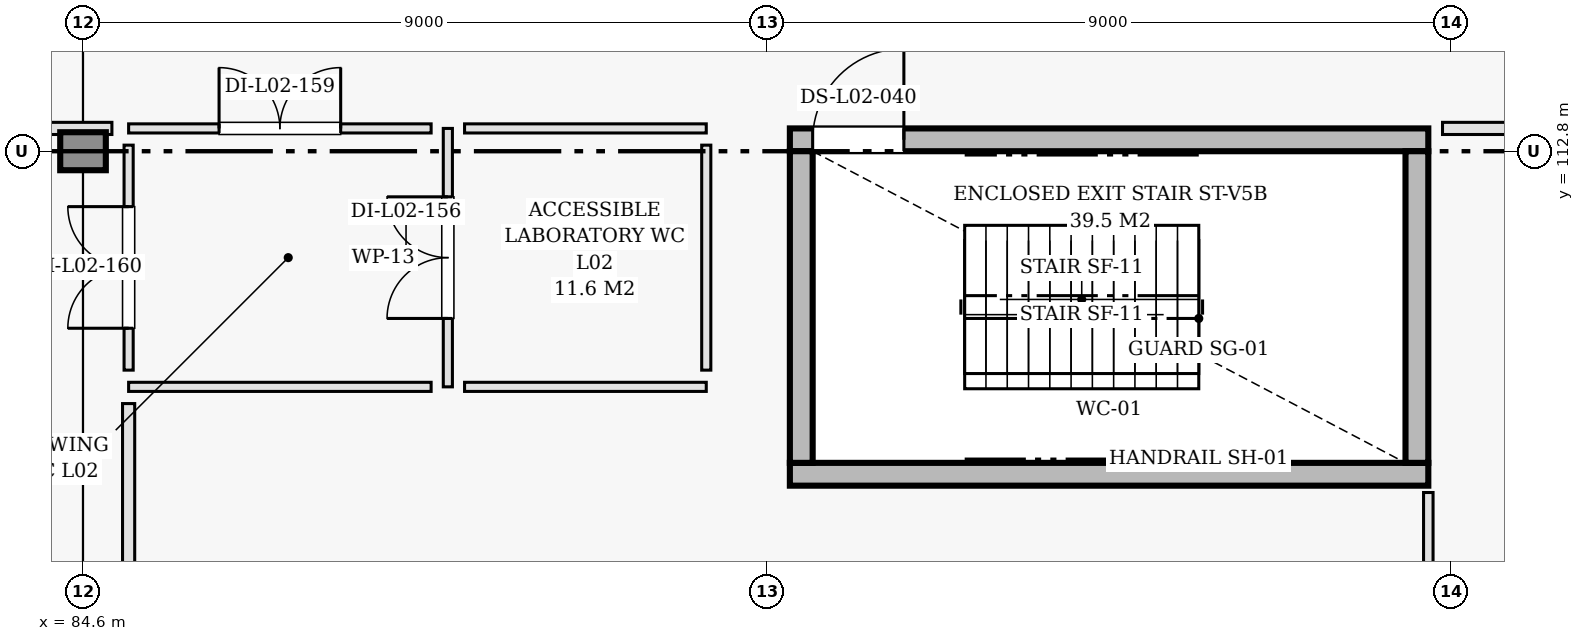
"""IFC4 building model, lengths in metres.
Left out: names, types, materials, properties, quantities, classifications, styles, units other than length and angle.
Written with IfcOpenShell. Run it as: python <this file> out.ifc"""

import sys

from ifc_helpers import new_model, si_unit, direction, frame, frame_2d, origin, origin_2d, place, context, subcontext, project, spatial, rectangle, extrude, element, fill, save


model = new_model("IFC4")
c1 = context("Model", 3, precision=1e-05, world=origin(), true_north=direction((0.0, 1.0)))
c2 = subcontext(c1, "Body", "Model", "MODEL_VIEW")
j1 = project(units=[si_unit("LENGTHUNIT", "METRE"), si_unit("PLANEANGLEUNIT", "RADIAN")], contexts=[c1])
p1 = place(None, origin())
s1 = spatial("IfcSite", under=j1, at=p1, CompositionType="ELEMENT")
p2 = place(p1, origin())
s2 = spatial("IfcBuilding", under=s1, at=p2, CompositionType="ELEMENT")
p3 = place(p2, frame((0.0, 0.0, 9.6)))
s3 = spatial("IfcBuildingStorey", under=s2, at=p3, CompositionType="ELEMENT", Elevation=9.6)
p4 = place(p3, frame((84.6, 112.8, 0.0), z_axis=(0.0, 0.0, 1.0), x_axis=(1.0, 0.0, 0.0)))
e1 = element("IfcColumn", 1, at=p4, inside=s3, PredefinedType="COLUMN", context=c2, shape_type="SweptSolid", body=[
    extrude(rectangle(XDim=0.5, YDim=0.5, at=origin_2d()), origin(), (0.0, 0.0, 1.0), 4.2),
])
p5 = place(p3, frame((93.9, 108.55, 0.0), z_axis=(0.0, 0.0, 1.0), x_axis=(1.0, 0.0, 0.0)))
e2 = element("IfcWall", 2, at=p5, inside=s3, PredefinedType="SHEAR", context=c2, shape_type="SweptSolid", body=[
    extrude(rectangle(XDim=8.4, YDim=0.3, at=frame_2d((4.2, 0.0))), origin(), (0.0, 0.0, 1.0), 3.94),
])
p6 = place(p3, frame((93.9, 112.95, 0.0), z_axis=(0.0, 0.0, 1.0), x_axis=(1.0, 0.0, 0.0)))
e3 = element("IfcWall", 3, at=p6, inside=s3, PredefinedType="SHEAR", context=c2, shape_type="SweptSolid", body=[
    extrude(rectangle(XDim=8.4, YDim=0.3, at=frame_2d((4.2, 0.0))), origin(), (0.0, 0.0, 1.0), 3.94),
])
p7 = place(p6, frame((0.3, 0.0, 0.0)))
e4 = element("IfcOpeningElement", 4, at=p7, cuts=e3, PredefinedType="OPENING", context=c2, shape_type="SweptSolid", body=[
    extrude(rectangle(XDim=1.2, YDim=2.15, at=frame_2d((0.6, 1.075))), frame((0.0, 0.16, 0.0), z_axis=(0.0, -1.0, 0.0), x_axis=(1.0, 0.0, 0.0)), (0.0, 0.0, 1.0), 0.32),
])
for number, where, z_axis, x_axis in (
    (5, (94.05, 108.7, 0.0), (0.0, 0.0, 1.0), (0.0, 1.0, 0.0)),
    (6, (102.15, 108.7, 0.0), (0.0, 0.0, 1.0), (0.0, 1.0, 0.0)),
):
    element("IfcWall", number, at=place(p3, frame(where, z_axis=z_axis, x_axis=x_axis)), inside=s3, PredefinedType="SHEAR", context=c2, shape_type="SweptSolid", body=[
        extrude(rectangle(XDim=4.1, YDim=0.3, at=frame_2d((2.05, 0.0))), origin(), (0.0, 0.0, 1.0), 3.94),
    ])
p8 = place(p3, frame((89.4, 109.7, 0.0), z_axis=(0.0, 0.0, 1.0), x_axis=(0.0, 1.0, 0.0)))
e7 = element("IfcWall", 7, at=p8, inside=s3, PredefinedType="PARTITIONING", context=c2, shape_type="SweptSolid", body=[
    extrude(rectangle(XDim=3.4, YDim=0.12, at=frame_2d((1.7, 0.0))), origin(), (0.0, 0.0, 1.0), 3.445),
])
p9 = place(p8, frame((0.9, 0.0, 0.0)))
e8 = element("IfcOpeningElement", 8, at=p9, cuts=e7, PredefinedType="OPENING", context=c2, shape_type="SweptSolid", body=[
    extrude(rectangle(XDim=1.6, YDim=2.2, at=frame_2d((0.8, 1.1))), frame((0.0, 0.07, 0.0), z_axis=(0.0, -1.0, 0.0), x_axis=(1.0, 0.0, 0.0)), (0.0, 0.0, 1.0), 0.14),
])
p10 = place(p3, frame((89.62, 109.7, 0.0), z_axis=(0.0, 0.0, 1.0), x_axis=(1.0, 0.0, 0.0)))
e9 = element("IfcWall", 9, at=p10, inside=s3, PredefinedType="PARTITIONING", context=c2, shape_type="SweptSolid", body=[
    extrude(rectangle(XDim=3.18, YDim=0.12, at=frame_2d((1.59, 0.0))), origin(), (0.0, 0.0, 1.0), 3.445),
])
p11 = place(p3, frame((89.62, 113.1, 0.0), z_axis=(0.0, 0.0, 1.0), x_axis=(1.0, 0.0, 0.0)))
e10 = element("IfcWall", 10, at=p11, inside=s3, PredefinedType="PARTITIONING", context=c2, shape_type="SweptSolid", body=[
    extrude(rectangle(XDim=3.18, YDim=0.12, at=frame_2d((1.59, 0.0))), origin(), (0.0, 0.0, 1.0), 3.94),
])
p12 = place(p3, frame((92.8, 109.92, 0.0), z_axis=(0.0, 0.0, 1.0), x_axis=(0.0, 1.0, 0.0)))
e11 = element("IfcWall", 11, at=p12, inside=s3, PredefinedType="PARTITIONING", context=c2, shape_type="SweptSolid", body=[
    extrude(rectangle(XDim=2.96, YDim=0.12, at=frame_2d((1.48, 0.0))), origin(), (0.0, 0.0, 1.0), 3.94),
])
p13 = place(p3, frame((85.2, 113.1, 0.0), z_axis=(0.0, 0.0, 1.0), x_axis=(1.0, 0.0, 0.0)))
e12 = element("IfcWall", 12, at=p13, inside=s3, PredefinedType="PARTITIONING", context=c2, shape_type="SweptSolid", body=[
    extrude(rectangle(XDim=3.98, YDim=0.12, at=frame_2d((1.99, 0.0))), origin(), (0.0, 0.0, 1.0), 3.94),
])
p14 = place(p13, frame((1.19, 0.0, 0.0)))
e13 = element("IfcOpeningElement", 13, at=p14, cuts=e12, PredefinedType="OPENING", context=c2, shape_type="SweptSolid", body=[
    extrude(rectangle(XDim=1.6, YDim=2.2, at=frame_2d((0.8, 1.1))), frame((0.0, 0.07, 0.0), z_axis=(0.0, -1.0, 0.0), x_axis=(1.0, 0.0, 0.0)), (0.0, 0.0, 1.0), 0.14),
])
p15 = place(p3, frame((85.2, 109.7, 0.0), z_axis=(0.0, 0.0, 1.0), x_axis=(1.0, 0.0, 0.0)))
e14 = element("IfcWall", 14, at=p15, inside=s3, PredefinedType="PARTITIONING", context=c2, shape_type="SweptSolid", body=[
    extrude(rectangle(XDim=3.98, YDim=0.12, at=frame_2d((1.99, 0.0))), origin(), (0.0, 0.0, 1.0), 3.445),
])
p16 = place(p3, frame((85.2, 109.92, 0.0), z_axis=(0.0, 0.0, 1.0), x_axis=(0.0, 1.0, 0.0)))
e15 = element("IfcWall", 15, at=p16, inside=s3, PredefinedType="PARTITIONING", context=c2, shape_type="SweptSolid", body=[
    extrude(rectangle(XDim=2.96, YDim=0.12, at=frame_2d((1.48, 0.0))), origin(), (0.0, 0.0, 1.0), 3.94),
])
p17 = place(p16, frame((0.551, 0.0, 0.0)))
e16 = element("IfcOpeningElement", 16, at=p17, cuts=e15, PredefinedType="OPENING", context=c2, shape_type="SweptSolid", body=[
    extrude(rectangle(XDim=1.6, YDim=2.2, at=frame_2d((0.8, 1.1))), frame((0.0, 0.07, 0.0), z_axis=(0.0, -1.0, 0.0), x_axis=(1.0, 0.0, 0.0)), (0.0, 0.0, 1.0), 0.14),
])
p18 = place(p3, frame((102.487, 113.1, 0.0), z_axis=(0.0, 0.0, 1.0), x_axis=(1.0, 0.0, 0.0)))
e17 = element("IfcWall", 17, at=p18, inside=s3, PredefinedType="PARTITIONING", context=c2, shape_type="SweptSolid", body=[
    extrude(rectangle(XDim=12.967, YDim=0.16, at=frame_2d((6.483, 0.0))), origin(), (0.0, 0.0, 1.0), 3.025),
])
p19 = place(p18, frame((5.583, 0.0, 0.0)))
e18 = element("IfcOpeningElement", 18, at=p19, cuts=e17, PredefinedType="OPENING", context=c2, shape_type="SweptSolid", body=[
    extrude(rectangle(XDim=1.8, YDim=2.2, at=frame_2d((0.9, 1.1))), frame((0.0, 0.09, 0.0), z_axis=(0.0, -1.0, 0.0), x_axis=(1.0, 0.0, 0.0)), (0.0, 0.0, 1.0), 0.18),
])
p20 = place(p3, frame((102.3, 103.855, 0.0), z_axis=(0.0, 0.0, 1.0), x_axis=(0.0, 1.0, 0.0)))
e19 = element("IfcWall", 19, at=p20, inside=s3, PredefinedType="PARTITIONING", context=c2, shape_type="SweptSolid", body=[
    extrude(rectangle(XDim=4.455, YDim=0.125, at=frame_2d((2.228, 0.0))), origin(), (0.0, 0.0, 1.0), 3.025),
])
p21 = place(p3, frame((80.146, 113.1, 0.0), z_axis=(0.0, 0.0, 1.0), x_axis=(1.0, 0.0, 0.0)))
e20 = element("IfcWall", 20, at=p21, inside=s3, PredefinedType="PARTITIONING", context=c2, shape_type="SweptSolid", body=[
    extrude(rectangle(XDim=4.834, YDim=0.16, at=frame_2d((2.417, 0.0))), origin(), (0.0, 0.0, 1.0), 3.275),
])
p22 = place(p3, frame((85.2, 103.855, 0.0), z_axis=(0.0, 0.0, 1.0), x_axis=(0.0, 1.0, 0.0)))
e21 = element("IfcWall", 21, at=p22, inside=s3, PredefinedType="PARTITIONING", context=c2, shape_type="SweptSolid", body=[
    extrude(rectangle(XDim=5.625, YDim=0.16, at=frame_2d((2.812, 0.0))), origin(), (0.0, 0.0, 1.0), 3.175),
])
p23 = place(p7, origin())
e22 = element("IfcDoor", 22, at=p23, inside=s3, OperationType="SINGLE_SWING_RIGHT", PredefinedType="DOOR", context=c2, shape_type="SweptSolid", body=[
    extrude(rectangle(XDim=1.2, YDim=2.15, at=frame_2d((0.6, 1.075))), frame((0.0, 0.025, 0.0), z_axis=(0.0, -1.0, 0.0), x_axis=(1.0, 0.0, 0.0)), (0.0, 0.0, 1.0), 0.05),
])
fill(e4, e22)
p24 = place(p9, origin())
e23 = element("IfcDoor", 23, at=p24, inside=s3, OperationType="DOUBLE_DOOR_SINGLE_SWING", PredefinedType="DOOR", context=c2, shape_type="SweptSolid", body=[
    extrude(rectangle(XDim=1.6, YDim=2.2, at=frame_2d((0.8, 1.1))), frame((0.0, 0.025, 0.0), z_axis=(0.0, -1.0, 0.0), x_axis=(1.0, 0.0, 0.0)), (0.0, 0.0, 1.0), 0.05),
])
fill(e8, e23)
p25 = place(p14, origin())
e24 = element("IfcDoor", 24, at=p25, inside=s3, OperationType="DOUBLE_DOOR_SINGLE_SWING", PredefinedType="DOOR", context=c2, shape_type="SweptSolid", body=[
    extrude(rectangle(XDim=1.6, YDim=2.2, at=frame_2d((0.8, 1.1))), frame((0.0, 0.025, 0.0), z_axis=(0.0, -1.0, 0.0), x_axis=(1.0, 0.0, 0.0)), (0.0, 0.0, 1.0), 0.05),
])
fill(e13, e24)
p26 = place(p17, origin())
e25 = element("IfcDoor", 25, at=p26, inside=s3, OperationType="DOUBLE_DOOR_SINGLE_SWING", PredefinedType="DOOR", context=c2, shape_type="SweptSolid", body=[
    extrude(rectangle(XDim=1.6, YDim=2.2, at=frame_2d((0.8, 1.1))), frame((0.0, 0.025, 0.0), z_axis=(0.0, -1.0, 0.0), x_axis=(1.0, 0.0, 0.0)), (0.0, 0.0, 1.0), 0.05),
])
fill(e16, e25)
save(model, sys.argv[1])
